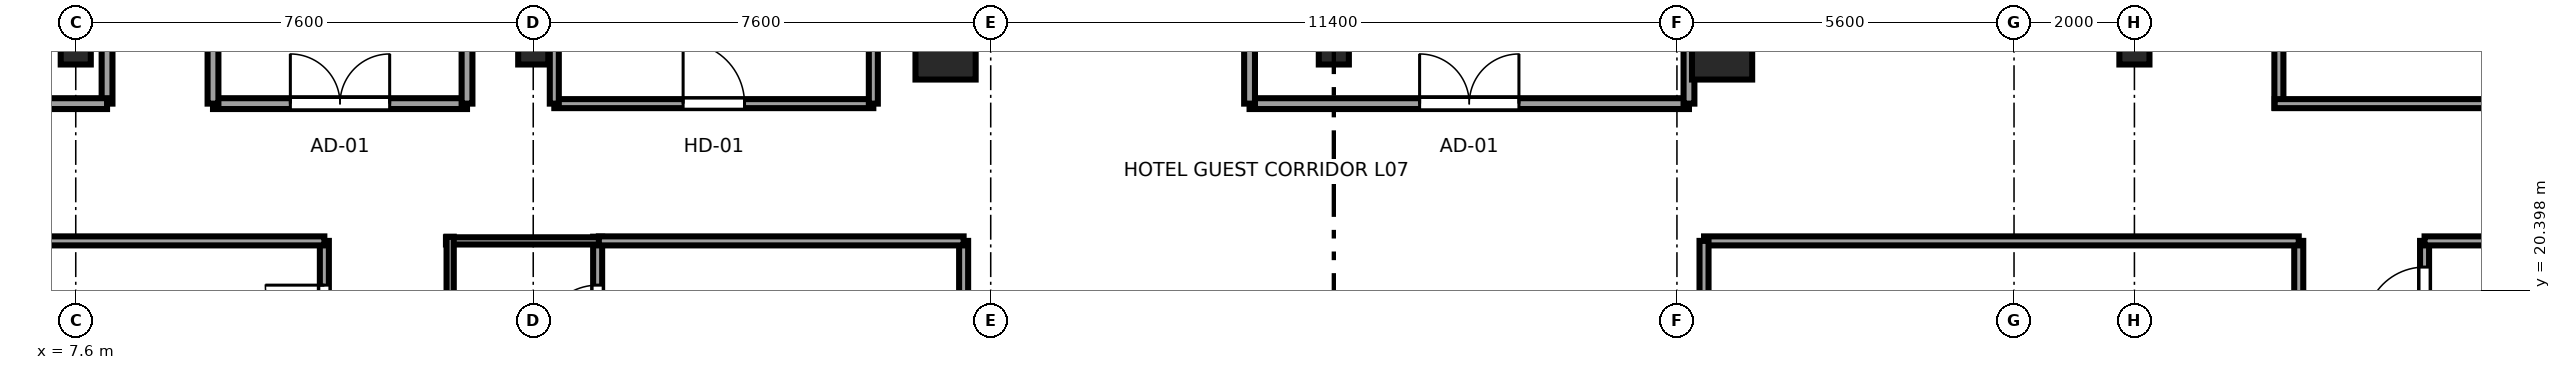
"""IFC4 building model, lengths in metres.
Left out: names, types, materials, properties, quantities, classifications, styles, units other than length and angle.
Written with IfcOpenShell. Run it as: python <this file> out.ifc"""

import sys

from ifc_helpers import new_model, si_unit, direction, frame, frame_2d, origin, origin_2d, place, context, subcontext, project, spatial, rectangle, i_section, extrude, source, transform, mapped, element, fill, save


model = new_model("IFC4")
c1 = context("Model", 3, precision=1e-05, world=origin(), true_north=direction((0.0, 1.0)))
c2 = subcontext(c1, "Body", "Model", "MODEL_VIEW")
j1 = project(units=[si_unit("LENGTHUNIT", "METRE"), si_unit("PLANEANGLEUNIT", "RADIAN")], contexts=[c1])
p1 = place(None, origin())
s1 = spatial("IfcSite", under=j1, at=p1, CompositionType="ELEMENT")
p2 = place(p1, origin())
s2 = spatial("IfcBuilding", under=s1, at=p2, CompositionType="ELEMENT")
p3 = place(p2, frame((0.0, 0.0, 35.55)))
s3 = spatial("IfcBuildingStorey", under=s2, at=p3, CompositionType="ELEMENT", Elevation=35.55)
m1 = source(origin(), c2, "Body", "SweptSolid", [
    extrude(i_section(OverallWidth=0.5, OverallDepth=0.5, WebThickness=0.028, FlangeThickness=0.045, at=origin_2d()), origin(), (0.0, 0.0, 1.0), 3.55),
])
for number, where, z_axis, x_axis in (
    (1, (7.6, 24.4, 0.0), (0.0, 0.0, 1.0), (1.0, 0.0, 0.0)),
    (2, (15.2, 24.4, 0.0), (0.0, 0.0, 1.0), (1.0, 0.0, 0.0)),
):
    element("IfcColumn", number, at=place(p3, frame(where, z_axis=z_axis, x_axis=x_axis)), inside=s3, PredefinedType="COLUMN", context=c2, shape_type="MappedRepresentation", body=[
        mapped(m1, transform((0.0, 0.0, 0.0), x_axis=(1.0, 0.0, 0.0), y_axis=(0.0, 1.0, 0.0), z_axis=(0.0, 0.0, 1.0), scale=1.0)),
    ])
m2 = source(origin(), c2, "Body", "SweptSolid", [
    extrude(rectangle(XDim=1.0, YDim=1.0, at=origin_2d()), origin(), (0.0, 0.0, 1.0), 3.55),
])
for number, where, z_axis, x_axis in (
    (3, (22.05, 24.4, 0.0), (0.0, 0.0, 1.0), (1.0, 0.0, 0.0)),
    (4, (34.95, 24.4, 0.0), (0.0, 0.0, 1.0), (1.0, 0.0, 0.0)),
):
    element("IfcColumn", number, at=place(p3, frame(where, z_axis=z_axis, x_axis=x_axis)), inside=s3, PredefinedType="COLUMN", context=c2, shape_type="MappedRepresentation", body=[
        mapped(m2, transform((0.0, 0.0, 0.0), x_axis=(1.0, 0.0, 0.0), y_axis=(0.0, 1.0, 0.0), z_axis=(0.0, 0.0, 1.0), scale=1.0)),
    ])
for number, where, z_axis, x_axis in (
    (5, (41.8, 24.4, 0.0), (0.0, 0.0, 1.0), (1.0, 0.0, 0.0)),
    (6, (28.5, 24.4, 0.0), (0.0, 0.0, 1.0), (1.0, 0.0, 0.0)),
):
    element("IfcColumn", number, at=place(p3, frame(where, z_axis=z_axis, x_axis=x_axis)), inside=s3, PredefinedType="COLUMN", context=c2, shape_type="MappedRepresentation", body=[
        mapped(m1, transform((0.0, 0.0, 0.0), x_axis=(1.0, 0.0, 0.0), y_axis=(0.0, 1.0, 0.0), z_axis=(0.0, 0.0, 1.0), scale=1.0)),
    ])
p4 = place(p3, frame((16.27, 18.9, 0.0), z_axis=(0.0, 0.0, 1.0), x_axis=(0.0, 1.0, 0.0)))
e7 = element("IfcWall", 7, at=p4, inside=s3, PredefinedType="PARTITIONING", context=c2, shape_type="SweptSolid", body=[
    extrude(rectangle(XDim=2.39, YDim=0.15, at=frame_2d((1.195, 0.0))), origin(), (0.0, 0.0, 1.0), 3.37),
])
p5 = place(p4, frame((0.665, 0.0, 0.0)))
e8 = element("IfcOpeningElement", 8, at=p5, cuts=e7, PredefinedType="OPENING", context=c2, shape_type="SweptSolid", body=[
    extrude(rectangle(XDim=0.92, YDim=2.01, at=frame_2d((0.46, 1.005))), frame((0.0, 0.085, 0.0), z_axis=(0.0, -1.0, 0.0), x_axis=(1.0, 0.0, 0.0)), (0.0, 0.0, 1.0), 0.17),
])
p6 = place(p3, frame((13.75, 21.22, 0.0), z_axis=(0.0, 0.0, 1.0), x_axis=(1.0, 0.0, 0.0)))
e9 = element("IfcWall", 9, at=p6, inside=s3, PredefinedType="PLUMBINGWALL", context=c2, shape_type="SweptSolid", body=[
    extrude(rectangle(XDim=2.59, YDim=0.12, at=frame_2d((1.295, 0.0))), origin(), (0.0, 0.0, 1.0), 3.37),
])
p7 = place(p3, frame((13.82, 18.9, 0.0), z_axis=(0.0, 0.0, 1.0), x_axis=(0.0, 1.0, 0.0)))
e10 = element("IfcWall", 10, at=p7, inside=s3, PredefinedType="PLUMBINGWALL", context=c2, shape_type="SweptSolid", body=[
    extrude(rectangle(XDim=2.39, YDim=0.12, at=frame_2d((1.195, 0.0))), origin(), (0.0, 0.0, 1.0), 3.37),
])
p8 = place(p3, frame((11.73, 18.81, 0.0), z_axis=(0.0, 0.0, 1.0), x_axis=(0.0, 1.0, 0.0)))
e11 = element("IfcWall", 11, at=p8, inside=s3, PredefinedType="PARTITIONING", context=c2, shape_type="SweptSolid", body=[
    extrude(rectangle(XDim=2.41, YDim=0.15, at=frame_2d((1.205, 0.0))), origin(), (0.0, 0.0, 1.0), 3.37),
])
p9 = place(p8, frame((0.695, 0.0, 0.0)))
e12 = element("IfcOpeningElement", 12, at=p9, cuts=e11, PredefinedType="OPENING", context=c2, shape_type="SweptSolid", body=[
    extrude(rectangle(XDim=0.98, YDim=2.12, at=frame_2d((0.49, 1.06))), frame((0.0, 0.085, 0.0), z_axis=(0.0, -1.0, 0.0), x_axis=(1.0, 0.0, 0.0)), (0.0, 0.0, 1.0), 0.17),
])
p10 = place(p3, frame((0.405, 21.22, 0.0), z_axis=(0.0, 0.0, 1.0), x_axis=(1.0, 0.0, 0.0)))
e13 = element("IfcWall", 13, at=p10, inside=s3, PredefinedType="PARTITIONING", context=c2, shape_type="SweptSolid", body=[
    extrude(rectangle(XDim=11.325, YDim=0.15, at=frame_2d((5.663, 0.0))), origin(), (0.0, 0.0, 1.0), 3.37),
])
p11 = place(p3, frame((22.35, 14.48, 0.0), z_axis=(0.0, 0.0, 1.0), x_axis=(0.0, 1.0, 0.0)))
e14 = element("IfcWall", 14, at=p11, inside=s3, PredefinedType="PARTITIONING", context=c2, shape_type="SweptSolid", body=[
    extrude(rectangle(XDim=6.74, YDim=0.15, at=frame_2d((3.37, 0.0))), origin(), (0.0, 0.0, 1.0), 3.37),
])
p12 = place(p3, frame((16.29, 21.22, 0.0), z_axis=(0.0, 0.0, 1.0), x_axis=(1.0, 0.0, 0.0)))
e15 = element("IfcWall", 15, at=p12, inside=s3, PredefinedType="PARTITIONING", context=c2, shape_type="SweptSolid", body=[
    extrude(rectangle(XDim=6.06, YDim=0.15, at=frame_2d((3.03, 0.0))), origin(), (0.0, 0.0, 1.0), 3.37),
])
p13 = place(p3, frame((44.53, 16.61, 0.0), z_axis=(0.0, 0.0, 1.0), x_axis=(0.0, 1.0, 0.0)))
e16 = element("IfcWall", 16, at=p13, inside=s3, PredefinedType="PARTITIONING", context=c2, shape_type="SweptSolid", body=[
    extrude(rectangle(XDim=4.61, YDim=0.15, at=frame_2d((2.305, 0.0))), origin(), (0.0, 0.0, 1.0), 3.37),
])
p14 = place(p13, frame((1.795, 0.0, 0.0)))
e17 = element("IfcOpeningElement", 17, at=p14, cuts=e16, PredefinedType="OPENING", context=c2, shape_type="SweptSolid", body=[
    extrude(rectangle(XDim=0.98, YDim=2.12, at=frame_2d((0.49, 1.06))), frame((0.0, 0.085, 0.0), z_axis=(0.0, -1.0, 0.0), x_axis=(1.0, 0.0, 0.0)), (0.0, 0.0, 1.0), 0.17),
])
p15 = place(p3, frame((34.65, 21.22, 0.0), z_axis=(0.0, 0.0, 1.0), x_axis=(1.0, 0.0, 0.0)))
e18 = element("IfcWall", 18, at=p15, inside=s3, PredefinedType="PARTITIONING", context=c2, shape_type="SweptSolid", body=[
    extrude(rectangle(XDim=9.88, YDim=0.15, at=frame_2d((4.94, 0.0))), origin(), (0.0, 0.0, 1.0), 3.37),
])
p16 = place(p3, frame((34.65, 14.28, 0.0), z_axis=(0.0, 0.0, 1.0), x_axis=(0.0, 1.0, 0.0)))
e19 = element("IfcWall", 19, at=p16, inside=s3, PredefinedType="PARTITIONING", context=c2, shape_type="SweptSolid", body=[
    extrude(rectangle(XDim=6.94, YDim=0.15, at=frame_2d((3.47, 0.0))), origin(), (0.0, 0.0, 1.0), 3.37),
])
p17 = place(p3, frame((46.62, 19.41, 0.0), z_axis=(0.0, 0.0, 1.0), x_axis=(0.0, 1.0, 0.0)))
e20 = element("IfcWall", 20, at=p17, inside=s3, PredefinedType="PARTITIONING", context=c2, shape_type="SweptSolid", body=[
    extrude(rectangle(XDim=1.81, YDim=0.15, at=frame_2d((0.905, 0.0))), origin(), (0.0, 0.0, 1.0), 3.37),
])
p18 = place(p17, frame((0.395, 0.0, 0.0)))
e21 = element("IfcOpeningElement", 21, at=p18, cuts=e20, PredefinedType="OPENING", context=c2, shape_type="SweptSolid", body=[
    extrude(rectangle(XDim=0.98, YDim=2.12, at=frame_2d((0.49, 1.06))), frame((0.0, 0.085, 0.0), z_axis=(0.0, -1.0, 0.0), x_axis=(1.0, 0.0, 0.0)), (0.0, 0.0, 1.0), 0.17),
])
p19 = place(p3, frame((46.62, 21.22, 0.0), z_axis=(0.0, 0.0, 1.0), x_axis=(1.0, 0.0, 0.0)))
e22 = element("IfcWall", 22, at=p19, inside=s3, PredefinedType="PARTITIONING", context=c2, shape_type="SweptSolid", body=[
    extrude(rectangle(XDim=9.975, YDim=0.15, at=frame_2d((4.987, 0.0))), origin(), (0.0, 0.0, 1.0), 3.37),
])
p20 = place(p3, frame((8.12, 23.5, 0.0), z_axis=(0.0, 0.0, 1.0), x_axis=(0.0, 1.0, 0.0)))
e23 = element("IfcWall", 23, at=p20, inside=s3, PredefinedType="PARTITIONING", context=c2, shape_type="SweptSolid", body=[
    extrude(rectangle(XDim=5.2, YDim=0.18, at=frame_2d((2.6, 0.0))), origin(), (0.0, 0.0, 1.0), 3.37),
])
p21 = place(p20, frame((2.325, 0.0, 0.0)))
e24 = element("IfcOpeningElement", 24, at=p21, cuts=e23, PredefinedType="OPENING", context=c2, shape_type="SweptSolid", body=[
    extrude(rectangle(XDim=1.65, YDim=2.15, at=frame_2d((0.825, 1.075))), frame((0.0, 0.1, 0.0), z_axis=(0.0, -1.0, 0.0), x_axis=(1.0, 0.0, 0.0)), (0.0, 0.0, 1.0), 0.2),
])
p22 = place(p3, frame((0.405, 23.5, 0.0), z_axis=(0.0, 0.0, 1.0), x_axis=(1.0, 0.0, 0.0)))
e25 = element("IfcWall", 25, at=p22, inside=s3, PredefinedType="PARTITIONING", context=c2, shape_type="SweptSolid", body=[
    extrude(rectangle(XDim=7.715, YDim=0.18, at=frame_2d((3.857, 0.0))), origin(), (0.0, 0.0, 1.0), 3.37),
])
p23 = place(p3, frame((44.2, 23.43, 0.0), z_axis=(0.0, 0.0, 1.0), x_axis=(0.0, 1.0, 0.0)))
e26 = element("IfcWall", 26, at=p23, inside=s3, PredefinedType="PARTITIONING", context=c2, shape_type="SweptSolid", body=[
    extrude(rectangle(XDim=3.94, YDim=0.15, at=frame_2d((1.97, 0.0))), origin(), (0.0, 0.0, 1.0), 3.37),
])
p24 = place(p23, frame((1.34, 0.0, 0.0)))
e27 = element("IfcOpeningElement", 27, at=p24, cuts=e26, PredefinedType="OPENING", context=c2, shape_type="SweptSolid", body=[
    extrude(rectangle(XDim=0.92, YDim=2.01, at=frame_2d((0.46, 1.005))), frame((0.0, 0.085, 0.0), z_axis=(0.0, -1.0, 0.0), x_axis=(1.0, 0.0, 0.0)), (0.0, 0.0, 1.0), 0.17),
])
p25 = place(p3, frame((44.13, 23.5, 0.0), z_axis=(0.0, 0.0, 1.0), x_axis=(1.0, 0.0, 0.0)))
e28 = element("IfcWall", 28, at=p25, inside=s3, PredefinedType="PARTITIONING", context=c2, shape_type="SweptSolid", body=[
    extrude(rectangle(XDim=4.54, YDim=0.15, at=frame_2d((2.27, 0.0))), origin(), (0.0, 0.0, 1.0), 3.37),
])
p26 = place(p3, frame((9.88, 23.5, 0.0), z_axis=(0.0, 0.0, 1.0), x_axis=(1.0, 0.0, 0.0)))
e29 = element("IfcWall", 29, at=p26, inside=s3, PredefinedType="PARTITIONING", context=c2, shape_type="SweptSolid", body=[
    extrude(rectangle(XDim=4.22, YDim=0.18, at=frame_2d((2.11, 0.0))), origin(), (0.0, 0.0, 1.0), 3.37),
])
p27 = place(p26, frame((1.285, 0.0, 0.0)))
e30 = element("IfcOpeningElement", 30, at=p27, cuts=e29, PredefinedType="OPENING", context=c2, shape_type="SweptSolid", body=[
    extrude(rectangle(XDim=1.65, YDim=2.15, at=frame_2d((0.825, 1.075))), frame((0.0, 0.1, 0.0), z_axis=(0.0, -1.0, 0.0), x_axis=(1.0, 0.0, 0.0)), (0.0, 0.0, 1.0), 0.2),
])
for number, where, z_axis, x_axis in (
    (31, (9.88, 23.5, 0.0), (0.0, 0.0, 1.0), (0.0, 1.0, 0.0)),
    (32, (14.1, 23.5, 0.0), (0.0, 0.0, 1.0), (0.0, 1.0, 0.0)),
):
    element("IfcWall", number, at=place(p3, frame(where, z_axis=z_axis, x_axis=x_axis)), inside=s3, PredefinedType="PARTITIONING", context=c2, shape_type="SweptSolid", body=[
        extrude(rectangle(XDim=6.25, YDim=0.18, at=frame_2d((3.125, 0.0))), origin(), (0.0, 0.0, 1.0), 3.37),
    ])
p28 = place(p3, frame((27.1, 23.5, 0.0), z_axis=(0.0, 0.0, 1.0), x_axis=(1.0, 0.0, 0.0)))
e33 = element("IfcWall", 33, at=p28, inside=s3, PredefinedType="PARTITIONING", context=c2, shape_type="SweptSolid", body=[
    extrude(rectangle(XDim=7.3, YDim=0.18, at=frame_2d((3.65, 0.0))), origin(), (0.0, 0.0, 1.0), 3.37),
])
p29 = place(p28, frame((2.825, 0.0, 0.0)))
e34 = element("IfcOpeningElement", 34, at=p29, cuts=e33, PredefinedType="OPENING", context=c2, shape_type="SweptSolid", body=[
    extrude(rectangle(XDim=1.65, YDim=2.15, at=frame_2d((0.825, 1.075))), frame((0.0, 0.1, 0.0), z_axis=(0.0, -1.0, 0.0), x_axis=(1.0, 0.0, 0.0)), (0.0, 0.0, 1.0), 0.2),
])
for number, where, z_axis, x_axis in (
    (35, (27.1, 23.5, 0.0), (0.0, 0.0, 1.0), (0.0, 1.0, 0.0)),
    (36, (34.4, 23.5, 0.0), (0.0, 0.0, 1.0), (0.0, 1.0, 0.0)),
):
    element("IfcWall", number, at=place(p3, frame(where, z_axis=z_axis, x_axis=x_axis)), inside=s3, PredefinedType="PARTITIONING", context=c2, shape_type="SweptSolid", body=[
        extrude(rectangle(XDim=6.3, YDim=0.18, at=frame_2d((3.15, 0.0))), origin(), (0.0, 0.0, 1.0), 3.37),
    ])
p30 = place(p3, frame((15.55, 23.5, 0.0), z_axis=(0.0, 0.0, 1.0), x_axis=(1.0, 0.0, 0.0)))
e37 = element("IfcWall", 37, at=p30, inside=s3, PredefinedType="PARTITIONING", context=c2, shape_type="SweptSolid", body=[
    extrude(rectangle(XDim=5.3, YDim=0.15, at=frame_2d((2.65, 0.0))), origin(), (0.0, 0.0, 1.0), 3.37),
])
p31 = place(p30, frame((2.14, 0.0, 0.0)))
e38 = element("IfcOpeningElement", 38, at=p31, cuts=e37, PredefinedType="OPENING", context=c2, shape_type="SweptSolid", body=[
    extrude(rectangle(XDim=1.02, YDim=2.03, at=frame_2d((0.51, 1.015))), frame((0.0, 0.085, 0.0), z_axis=(0.0, -1.0, 0.0), x_axis=(1.0, 0.0, 0.0)), (0.0, 0.0, 1.0), 0.17),
])
for number, where, z_axis, x_axis in (
    (39, (15.55, 23.5, 0.0), (0.0, 0.0, 1.0), (0.0, 1.0, 0.0)),
    (40, (20.85, 23.5, 0.0), (0.0, 0.0, 1.0), (0.0, 1.0, 0.0)),
):
    element("IfcWall", number, at=place(p3, frame(where, z_axis=z_axis, x_axis=x_axis)), inside=s3, PredefinedType="PARTITIONING", context=c2, shape_type="SweptSolid", body=[
        extrude(rectangle(XDim=6.3, YDim=0.15, at=frame_2d((3.15, 0.0))), origin(), (0.0, 0.0, 1.0), 3.37),
    ])
m3 = source(origin(), c2, "Body", "SweptSolid", [
    extrude(rectangle(XDim=0.92, YDim=2.01, at=frame_2d((0.46, 1.005))), frame((0.0, 0.025, 0.0), z_axis=(0.0, -1.0, 0.0), x_axis=(1.0, 0.0, 0.0)), (0.0, 0.0, 1.0), 0.05),
])
p32 = place(p5, origin())
e41 = element("IfcDoor", 41, at=p32, inside=s3, OperationType="SINGLE_SWING_LEFT", PredefinedType="DOOR", context=c2, shape_type="MappedRepresentation", body=[
    mapped(m3, transform((0.0, 0.0, 0.0), x_axis=(1.0, 0.0, 0.0), y_axis=(0.0, 1.0, 0.0), z_axis=(0.0, 0.0, 1.0), scale=1.0)),
])
fill(e8, e41)
m4 = source(origin(), c2, "Body", "SweptSolid", [
    extrude(rectangle(XDim=0.98, YDim=2.12, at=frame_2d((0.49, 1.06))), frame((0.0, 0.025, 0.0), z_axis=(0.0, -1.0, 0.0), x_axis=(1.0, 0.0, 0.0)), (0.0, 0.0, 1.0), 0.05),
])
p33 = place(p9, origin())
e42 = element("IfcDoor", 42, at=p33, inside=s3, OperationType="SINGLE_SWING_RIGHT", PredefinedType="DOOR", context=c2, shape_type="MappedRepresentation", body=[
    mapped(m4, transform((0.0, 0.0, 0.0), x_axis=(1.0, 0.0, 0.0), y_axis=(0.0, 1.0, 0.0), z_axis=(0.0, 0.0, 1.0), scale=1.0)),
])
fill(e12, e42)
p34 = place(p18, origin())
e43 = element("IfcDoor", 43, at=p34, inside=s3, OperationType="SINGLE_SWING_LEFT", PredefinedType="DOOR", context=c2, shape_type="MappedRepresentation", body=[
    mapped(m4, transform((0.0, 0.0, 0.0), x_axis=(1.0, 0.0, 0.0), y_axis=(0.0, 1.0, 0.0), z_axis=(0.0, 0.0, 1.0), scale=1.0)),
])
fill(e21, e43)
m5 = source(origin(), c2, "Body", "SweptSolid", [
    extrude(rectangle(XDim=1.65, YDim=2.15, at=frame_2d((0.825, 1.075))), frame((0.0, 0.025, 0.0), z_axis=(0.0, -1.0, 0.0), x_axis=(1.0, 0.0, 0.0)), (0.0, 0.0, 1.0), 0.05),
])
p35 = place(p27, origin())
e44 = element("IfcDoor", 44, at=p35, inside=s3, OperationType="DOUBLE_DOOR_SINGLE_SWING", PredefinedType="DOOR", context=c2, shape_type="MappedRepresentation", body=[
    mapped(m5, transform((0.0, 0.0, 0.0), x_axis=(1.0, 0.0, 0.0), y_axis=(0.0, 1.0, 0.0), z_axis=(0.0, 0.0, 1.0), scale=1.0)),
])
fill(e30, e44)
p36 = place(p29, origin())
e45 = element("IfcDoor", 45, at=p36, inside=s3, OperationType="DOUBLE_DOOR_SINGLE_SWING", PredefinedType="DOOR", context=c2, shape_type="MappedRepresentation", body=[
    mapped(m5, transform((0.0, 0.0, 0.0), x_axis=(1.0, 0.0, 0.0), y_axis=(0.0, 1.0, 0.0), z_axis=(0.0, 0.0, 1.0), scale=1.0)),
])
fill(e34, e45)
m6 = source(origin(), c2, "Body", "SweptSolid", [
    extrude(rectangle(XDim=1.02, YDim=2.03, at=frame_2d((0.51, 1.015))), frame((0.0, 0.025, 0.0), z_axis=(0.0, -1.0, 0.0), x_axis=(1.0, 0.0, 0.0)), (0.0, 0.0, 1.0), 0.05),
])
p37 = place(p31, origin())
e46 = element("IfcDoor", 46, at=p37, inside=s3, OperationType="SINGLE_SWING_LEFT", PredefinedType="DOOR", context=c2, shape_type="MappedRepresentation", body=[
    mapped(m6, transform((0.0, 0.0, 0.0), x_axis=(1.0, 0.0, 0.0), y_axis=(0.0, 1.0, 0.0), z_axis=(0.0, 0.0, 1.0), scale=1.0)),
])
fill(e38, e46)
save(model, sys.argv[1])
